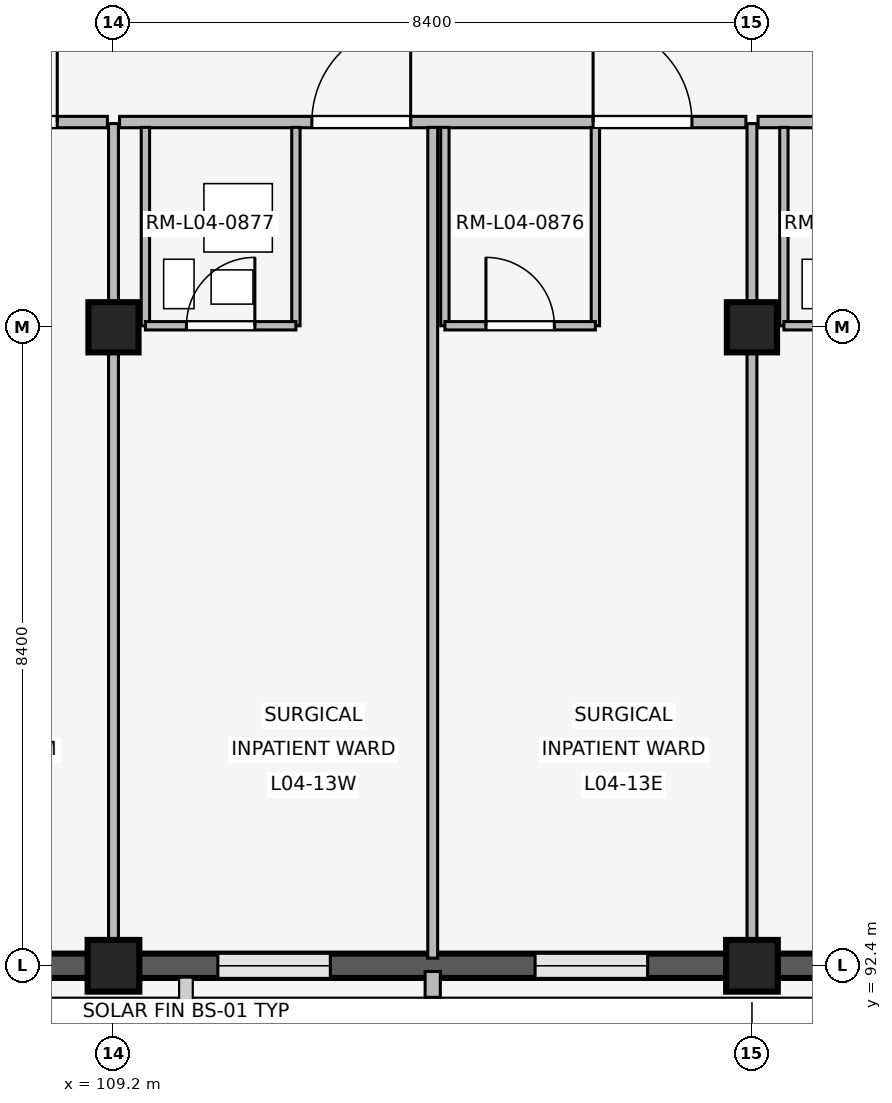
"""IFC4 building model, lengths in metres.
Left out: names, types, materials, properties, quantities, classifications, styles, units other than length and angle.
Written with IfcOpenShell. Run it as: python <this file> out.ifc"""

import sys

from ifc_helpers import new_model, si_unit, direction, frame, frame_2d, origin, origin_2d, place, context, subcontext, project, spatial, rectangle, extrude, element, fill, save


model = new_model("IFC4")
c1 = context("Model", 3, precision=1e-05, world=origin(), true_north=direction((0.0, 1.0)))
c2 = subcontext(c1, "Body", "Model", "MODEL_VIEW")
j1 = project(units=[si_unit("LENGTHUNIT", "METRE"), si_unit("PLANEANGLEUNIT", "RADIAN")], contexts=[c1])
p1 = place(None, origin())
s1 = spatial("IfcSite", under=j1, at=p1, CompositionType="ELEMENT")
p2 = place(p1, origin())
s2 = spatial("IfcBuilding", under=s1, at=p2, CompositionType="ELEMENT")
p3 = place(p2, frame((0.0, 0.0, 16.2)))
s3 = spatial("IfcBuildingStorey", under=s2, at=p3, CompositionType="ELEMENT", Elevation=16.2)
p4 = place(p3, frame((109.2, 92.4, 0.0), z_axis=(0.0, 0.0, 1.0), x_axis=(1.0, 0.0, 0.0)))
e1 = element("IfcColumn", 1, at=p4, inside=s3, PredefinedType="COLUMN", context=c2, shape_type="SweptSolid", body=[
    extrude(rectangle(XDim=0.68, YDim=0.68, at=origin_2d()), origin(), (0.0, 0.0, 1.0), 4.2),
])
p5 = place(p3, frame((109.2, 100.8, 0.0), z_axis=(0.0, 0.0, 1.0), x_axis=(1.0, 0.0, 0.0)))
e2 = element("IfcColumn", 2, at=p5, inside=s3, PredefinedType="COLUMN", context=c2, shape_type="SweptSolid", body=[
    extrude(rectangle(XDim=0.66, YDim=0.66, at=origin_2d()), origin(), (0.0, 0.0, 1.0), 4.2),
])
p6 = place(p3, frame((117.6, 92.4, 0.0), z_axis=(0.0, 0.0, 1.0), x_axis=(1.0, 0.0, 0.0)))
e3 = element("IfcColumn", 3, at=p6, inside=s3, PredefinedType="COLUMN", context=c2, shape_type="SweptSolid", body=[
    extrude(rectangle(XDim=0.68, YDim=0.68, at=origin_2d()), origin(), (0.0, 0.0, 1.0), 4.2),
])
p7 = place(p3, frame((117.6, 100.8, 0.0), z_axis=(0.0, 0.0, 1.0), x_axis=(1.0, 0.0, 0.0)))
e4 = element("IfcColumn", 4, at=p7, inside=s3, PredefinedType="COLUMN", context=c2, shape_type="SweptSolid", body=[
    extrude(rectangle(XDim=0.66, YDim=0.66, at=origin_2d()), origin(), (0.0, 0.0, 1.0), 4.2),
])
p8 = place(p3, frame((108.865, 92.4, 0.0), z_axis=(0.0, 0.0, 1.0), x_axis=(-1.0, 0.0, 0.0)))
e5 = element("IfcWall", 5, at=p8, inside=s3, PredefinedType="SOLIDWALL", context=c2, shape_type="SweptSolid", body=[
    extrude(rectangle(XDim=7.73, YDim=0.32, at=frame_2d((3.865, 0.0))), origin(), (0.0, 0.0, 1.0), 3.32),
])
p9 = place(p8, frame((0.988, 0.0, 0.85)))
e6 = element("IfcOpeningElement", 6, at=p9, cuts=e5, PredefinedType="OPENING", context=c2, shape_type="SweptSolid", body=[
    extrude(rectangle(XDim=1.58, YDim=1.7, at=frame_2d((0.79, 0.85))), frame((0.0, 0.17, 0.0), z_axis=(0.0, -1.0, 0.0), x_axis=(1.0, 0.0, 0.0)), (0.0, 0.0, 1.0), 0.34),
])
p10 = place(p8, frame((5.162, 0.0, 0.85)))
e7 = element("IfcOpeningElement", 7, at=p10, cuts=e5, PredefinedType="OPENING", context=c2, shape_type="SweptSolid", body=[
    extrude(rectangle(XDim=1.58, YDim=1.7, at=frame_2d((0.79, 0.85))), frame((0.0, 0.17, 0.0), z_axis=(0.0, -1.0, 0.0), x_axis=(1.0, 0.0, 0.0)), (0.0, 0.0, 1.0), 0.34),
])
p11 = place(p3, frame((117.265, 92.4, 0.0), z_axis=(0.0, 0.0, 1.0), x_axis=(-1.0, 0.0, 0.0)))
e8 = element("IfcWall", 8, at=p11, inside=s3, PredefinedType="SOLIDWALL", context=c2, shape_type="SweptSolid", body=[
    extrude(rectangle(XDim=7.73, YDim=0.32, at=frame_2d((3.865, 0.0))), origin(), (0.0, 0.0, 1.0), 3.32),
])
p12 = place(p11, frame((1.038, 0.0, 0.85)))
e9 = element("IfcOpeningElement", 9, at=p12, cuts=e8, PredefinedType="OPENING", context=c2, shape_type="SweptSolid", body=[
    extrude(rectangle(XDim=1.48, YDim=1.6, at=frame_2d((0.74, 0.8))), frame((0.0, 0.17, 0.0), z_axis=(0.0, -1.0, 0.0), x_axis=(1.0, 0.0, 0.0)), (0.0, 0.0, 1.0), 0.34),
])
p13 = place(p11, frame((5.212, 0.0, 0.85)))
e10 = element("IfcOpeningElement", 10, at=p13, cuts=e8, PredefinedType="OPENING", context=c2, shape_type="SweptSolid", body=[
    extrude(rectangle(XDim=1.48, YDim=1.6, at=frame_2d((0.74, 0.8))), frame((0.0, 0.17, 0.0), z_axis=(0.0, -1.0, 0.0), x_axis=(1.0, 0.0, 0.0)), (0.0, 0.0, 1.0), 0.34),
])
p14 = place(p3, frame((113.4, 92.325, 0.0), z_axis=(0.0, 0.0, 1.0), x_axis=(0.0, -1.0, 0.0)))
e11 = element("IfcWall", 11, at=p14, inside=s3, PredefinedType="ELEMENTEDWALL", context=c2, shape_type="SweptSolid", body=[
    extrude(rectangle(XDim=0.34, YDim=0.2, at=frame_2d((0.17, 0.0))), origin(), (0.0, 0.0, 1.0), 3.3),
])
p15 = place(p3, frame((125.665, 92.4, 0.0), z_axis=(0.0, 0.0, 1.0), x_axis=(-1.0, 0.0, 0.0)))
e12 = element("IfcWall", 12, at=p15, inside=s3, PredefinedType="SOLIDWALL", context=c2, shape_type="SweptSolid", body=[
    extrude(rectangle(XDim=7.73, YDim=0.32, at=frame_2d((3.865, 0.0))), origin(), (0.0, 0.0, 1.0), 3.32),
])
p16 = place(p15, frame((1.068, 0.0, 0.85)))
e13 = element("IfcOpeningElement", 13, at=p16, cuts=e12, PredefinedType="OPENING", context=c2, shape_type="SweptSolid", body=[
    extrude(rectangle(XDim=1.42, YDim=1.45, at=frame_2d((0.71, 0.725))), frame((0.0, 0.17, 0.0), z_axis=(0.0, -1.0, 0.0), x_axis=(1.0, 0.0, 0.0)), (0.0, 0.0, 1.0), 0.34),
])
p17 = place(p15, frame((5.242, 0.0, 0.85)))
e14 = element("IfcOpeningElement", 14, at=p17, cuts=e12, PredefinedType="OPENING", context=c2, shape_type="SweptSolid", body=[
    extrude(rectangle(XDim=1.42, YDim=1.45, at=frame_2d((0.71, 0.725))), frame((0.0, 0.17, 0.0), z_axis=(0.0, -1.0, 0.0), x_axis=(1.0, 0.0, 0.0)), (0.0, 0.0, 1.0), 0.34),
])
p18 = place(p3, frame((100.88, 103.5, 0.0), z_axis=(0.0, 0.0, 1.0), x_axis=(1.0, 0.0, 0.0)))
e15 = element("IfcWall", 15, at=p18, inside=s3, PredefinedType="PARTITIONING", context=c2, shape_type="SweptSolid", body=[
    extrude(rectangle(XDim=8.24, YDim=0.15, at=frame_2d((4.12, 0.0))), origin(), (0.0, 0.0, 1.0), 3.3),
])
p19 = place(p18, frame((2.53, 0.0, 0.0)))
e16 = element("IfcOpeningElement", 16, at=p19, cuts=e15, PredefinedType="OPENING", context=c2, shape_type="SweptSolid", body=[
    extrude(rectangle(XDim=1.35, YDim=2.25, at=frame_2d((0.675, 1.125))), frame((0.0, 0.085, 0.0), z_axis=(0.0, -1.0, 0.0), x_axis=(1.0, 0.0, 0.0)), (0.0, 0.0, 1.0), 0.17),
])
p20 = place(p18, frame((6.23, 0.0, 0.0)))
e17 = element("IfcOpeningElement", 17, at=p20, cuts=e15, PredefinedType="OPENING", context=c2, shape_type="SweptSolid", body=[
    extrude(rectangle(XDim=1.35, YDim=2.25, at=frame_2d((0.675, 1.125))), frame((0.0, 0.085, 0.0), z_axis=(0.0, -1.0, 0.0), x_axis=(1.0, 0.0, 0.0)), (0.0, 0.0, 1.0), 0.17),
])
p21 = place(p3, frame((109.2, 92.54, 0.0), z_axis=(0.0, 0.0, 1.0), x_axis=(0.0, 1.0, 0.0)))
e18 = element("IfcWall", 18, at=p21, inside=s3, PredefinedType="PARTITIONING", context=c2, shape_type="SweptSolid", body=[
    extrude(rectangle(XDim=10.94, YDim=0.13, at=frame_2d((5.47, 0.0))), origin(), (0.0, 0.0, 1.0), 3.3),
])
p22 = place(p3, frame((109.28, 103.5, 0.0), z_axis=(0.0, 0.0, 1.0), x_axis=(1.0, 0.0, 0.0)))
e19 = element("IfcWall", 19, at=p22, inside=s3, PredefinedType="PARTITIONING", context=c2, shape_type="SweptSolid", body=[
    extrude(rectangle(XDim=8.24, YDim=0.15, at=frame_2d((4.12, 0.0))), origin(), (0.0, 0.0, 1.0), 3.3),
])
p23 = place(p22, frame((2.53, 0.0, 0.0)))
e20 = element("IfcOpeningElement", 20, at=p23, cuts=e19, PredefinedType="OPENING", context=c2, shape_type="SweptSolid", body=[
    extrude(rectangle(XDim=1.3, YDim=2.25, at=frame_2d((0.65, 1.125))), frame((0.0, 0.085, 0.0), z_axis=(0.0, -1.0, 0.0), x_axis=(1.0, 0.0, 0.0)), (0.0, 0.0, 1.0), 0.17),
])
p24 = place(p22, frame((6.23, 0.0, 0.0)))
e21 = element("IfcOpeningElement", 21, at=p24, cuts=e19, PredefinedType="OPENING", context=c2, shape_type="SweptSolid", body=[
    extrude(rectangle(XDim=1.3, YDim=2.25, at=frame_2d((0.65, 1.125))), frame((0.0, 0.085, 0.0), z_axis=(0.0, -1.0, 0.0), x_axis=(1.0, 0.0, 0.0)), (0.0, 0.0, 1.0), 0.17),
])
p25 = place(p3, frame((113.4, 92.5, 0.0), z_axis=(0.0, 0.0, 1.0), x_axis=(0.0, 1.0, 0.0)))
e22 = element("IfcWall", 22, at=p25, inside=s3, PredefinedType="PARTITIONING", context=c2, shape_type="SweptSolid", body=[
    extrude(rectangle(XDim=10.93, YDim=0.13, at=frame_2d((5.465, 0.0))), origin(), (0.0, 0.0, 1.0), 3.3),
])
for number, where, z_axis, x_axis in (
    (23, (109.62, 100.82, 0.0), (0.0, 0.0, 1.0), (0.0, 1.0, 0.0)),
    (24, (111.6, 100.82, 0.0), (0.0, 0.0, 1.0), (0.0, 1.0, 0.0)),
):
    element("IfcWall", number, at=place(p3, frame(where, z_axis=z_axis, x_axis=x_axis)), inside=s3, PredefinedType="PARTITIONING", context=c2, shape_type="SweptSolid", body=[
        extrude(rectangle(XDim=2.61, YDim=0.11, at=frame_2d((1.305, 0.0))), origin(), (0.0, 0.0, 1.0), 3.3),
    ])
p26 = place(p3, frame((109.62, 100.82, 0.0), z_axis=(0.0, 0.0, 1.0), x_axis=(1.0, 0.0, 0.0)))
e25 = element("IfcWall", 25, at=p26, inside=s3, PredefinedType="PARTITIONING", context=c2, shape_type="SweptSolid", body=[
    extrude(rectangle(XDim=1.98, YDim=0.11, at=frame_2d((0.99, 0.0))), origin(), (0.0, 0.0, 1.0), 3.3),
])
p27 = place(p26, frame((0.54, 0.0, 0.0)))
e26 = element("IfcOpeningElement", 26, at=p27, cuts=e25, PredefinedType="OPENING", context=c2, shape_type="SweptSolid", body=[
    extrude(rectangle(XDim=0.9, YDim=2.1, at=frame_2d((0.45, 1.05))), frame((0.0, 0.065, 0.0), z_axis=(0.0, -1.0, 0.0), x_axis=(1.0, 0.0, 0.0)), (0.0, 0.0, 1.0), 0.13),
])
for number, where, z_axis, x_axis in (
    (27, (113.56, 100.82, 0.0), (0.0, 0.0, 1.0), (0.0, 1.0, 0.0)),
    (28, (115.54, 100.82, 0.0), (0.0, 0.0, 1.0), (0.0, 1.0, 0.0)),
):
    element("IfcWall", number, at=place(p3, frame(where, z_axis=z_axis, x_axis=x_axis)), inside=s3, PredefinedType="PARTITIONING", context=c2, shape_type="SweptSolid", body=[
        extrude(rectangle(XDim=2.61, YDim=0.11, at=frame_2d((1.305, 0.0))), origin(), (0.0, 0.0, 1.0), 3.3),
    ])
p28 = place(p3, frame((113.56, 100.82, 0.0), z_axis=(0.0, 0.0, 1.0), x_axis=(1.0, 0.0, 0.0)))
e29 = element("IfcWall", 29, at=p28, inside=s3, PredefinedType="PARTITIONING", context=c2, shape_type="SweptSolid", body=[
    extrude(rectangle(XDim=1.98, YDim=0.11, at=frame_2d((0.99, 0.0))), origin(), (0.0, 0.0, 1.0), 3.3),
])
p29 = place(p28, frame((0.54, 0.0, 0.0)))
e30 = element("IfcOpeningElement", 30, at=p29, cuts=e29, PredefinedType="OPENING", context=c2, shape_type="SweptSolid", body=[
    extrude(rectangle(XDim=0.9, YDim=2.1, at=frame_2d((0.45, 1.05))), frame((0.0, 0.065, 0.0), z_axis=(0.0, -1.0, 0.0), x_axis=(1.0, 0.0, 0.0)), (0.0, 0.0, 1.0), 0.13),
])
p30 = place(p3, frame((117.6, 92.54, 0.0), z_axis=(0.0, 0.0, 1.0), x_axis=(0.0, 1.0, 0.0)))
e31 = element("IfcWall", 31, at=p30, inside=s3, PredefinedType="PARTITIONING", context=c2, shape_type="SweptSolid", body=[
    extrude(rectangle(XDim=10.94, YDim=0.13, at=frame_2d((5.47, 0.0))), origin(), (0.0, 0.0, 1.0), 3.3),
])
p31 = place(p3, frame((117.68, 103.5, 0.0), z_axis=(0.0, 0.0, 1.0), x_axis=(1.0, 0.0, 0.0)))
e32 = element("IfcWall", 32, at=p31, inside=s3, PredefinedType="PARTITIONING", context=c2, shape_type="SweptSolid", body=[
    extrude(rectangle(XDim=8.24, YDim=0.15, at=frame_2d((4.12, 0.0))), origin(), (0.0, 0.0, 1.0), 3.3),
])
p32 = place(p31, frame((2.53, 0.0, 0.0)))
e33 = element("IfcOpeningElement", 33, at=p32, cuts=e32, PredefinedType="OPENING", context=c2, shape_type="SweptSolid", body=[
    extrude(rectangle(XDim=1.3, YDim=2.25, at=frame_2d((0.65, 1.125))), frame((0.0, 0.085, 0.0), z_axis=(0.0, -1.0, 0.0), x_axis=(1.0, 0.0, 0.0)), (0.0, 0.0, 1.0), 0.17),
])
p33 = place(p31, frame((6.23, 0.0, 0.0)))
e34 = element("IfcOpeningElement", 34, at=p33, cuts=e32, PredefinedType="OPENING", context=c2, shape_type="SweptSolid", body=[
    extrude(rectangle(XDim=1.3, YDim=2.25, at=frame_2d((0.65, 1.125))), frame((0.0, 0.085, 0.0), z_axis=(0.0, -1.0, 0.0), x_axis=(1.0, 0.0, 0.0)), (0.0, 0.0, 1.0), 0.17),
])
p34 = place(p3, frame((118.02, 100.82, 0.0), z_axis=(0.0, 0.0, 1.0), x_axis=(0.0, 1.0, 0.0)))
e35 = element("IfcWall", 35, at=p34, inside=s3, PredefinedType="PARTITIONING", context=c2, shape_type="SweptSolid", body=[
    extrude(rectangle(XDim=2.61, YDim=0.11, at=frame_2d((1.305, 0.0))), origin(), (0.0, 0.0, 1.0), 3.3),
])
p35 = place(p3, frame((118.02, 100.82, 0.0), z_axis=(0.0, 0.0, 1.0), x_axis=(1.0, 0.0, 0.0)))
e36 = element("IfcWall", 36, at=p35, inside=s3, PredefinedType="PARTITIONING", context=c2, shape_type="SweptSolid", body=[
    extrude(rectangle(XDim=1.98, YDim=0.11, at=frame_2d((0.99, 0.0))), origin(), (0.0, 0.0, 1.0), 3.3),
])
p36 = place(p35, frame((0.54, 0.0, 0.0)))
e37 = element("IfcOpeningElement", 37, at=p36, cuts=e36, PredefinedType="OPENING", context=c2, shape_type="SweptSolid", body=[
    extrude(rectangle(XDim=0.9, YDim=2.1, at=frame_2d((0.45, 1.05))), frame((0.0, 0.065, 0.0), z_axis=(0.0, -1.0, 0.0), x_axis=(1.0, 0.0, 0.0)), (0.0, 0.0, 1.0), 0.13),
])
p37 = place(p12, origin())
e38 = element("IfcWindow", 38, at=p37, inside=s3, PartitioningType="SINGLE_PANEL", PredefinedType="WINDOW", context=c2, shape_type="SweptSolid", body=[
    extrude(rectangle(XDim=1.48, YDim=1.6, at=frame_2d((0.74, 0.8))), frame((0.0, 0.03, 0.0), z_axis=(0.0, -1.0, 0.0), x_axis=(1.0, 0.0, 0.0)), (0.0, 0.0, 1.0), 0.06),
])
fill(e9, e38)
p38 = place(p13, origin())
e39 = element("IfcWindow", 39, at=p38, inside=s3, PartitioningType="SINGLE_PANEL", PredefinedType="WINDOW", context=c2, shape_type="SweptSolid", body=[
    extrude(rectangle(XDim=1.48, YDim=1.6, at=frame_2d((0.74, 0.8))), frame((0.0, 0.03, 0.0), z_axis=(0.0, -1.0, 0.0), x_axis=(1.0, 0.0, 0.0)), (0.0, 0.0, 1.0), 0.06),
])
fill(e10, e39)
p39 = place(p20, origin())
e40 = element("IfcDoor", 40, at=p39, inside=s3, OperationType="SINGLE_SWING_RIGHT", PredefinedType="DOOR", context=c2, shape_type="SweptSolid", body=[
    extrude(rectangle(XDim=1.35, YDim=2.25, at=frame_2d((0.675, 1.125))), frame((0.0, 0.025, 0.0), z_axis=(0.0, -1.0, 0.0), x_axis=(1.0, 0.0, 0.0)), (0.0, 0.0, 1.0), 0.05),
])
fill(e17, e40)
p40 = place(p23, origin())
e41 = element("IfcDoor", 41, at=p40, inside=s3, OperationType="SINGLE_SWING_RIGHT", PredefinedType="DOOR", context=c2, shape_type="SweptSolid", body=[
    extrude(rectangle(XDim=1.3, YDim=2.25, at=frame_2d((0.65, 1.125))), frame((0.0, 0.025, 0.0), z_axis=(0.0, -1.0, 0.0), x_axis=(1.0, 0.0, 0.0)), (0.0, 0.0, 1.0), 0.05),
])
fill(e20, e41)
p41 = place(p24, origin())
e42 = element("IfcDoor", 42, at=p41, inside=s3, OperationType="SINGLE_SWING_LEFT", PredefinedType="DOOR", context=c2, shape_type="SweptSolid", body=[
    extrude(rectangle(XDim=1.3, YDim=2.25, at=frame_2d((0.65, 1.125))), frame((0.0, 0.025, 0.0), z_axis=(0.0, -1.0, 0.0), x_axis=(1.0, 0.0, 0.0)), (0.0, 0.0, 1.0), 0.05),
])
fill(e21, e42)
p42 = place(p27, origin())
e43 = element("IfcDoor", 43, at=p42, inside=s3, OperationType="SINGLE_SWING_RIGHT", PredefinedType="DOOR", context=c2, shape_type="SweptSolid", body=[
    extrude(rectangle(XDim=0.9, YDim=2.1, at=frame_2d((0.45, 1.05))), frame((0.0, 0.025, 0.0), z_axis=(0.0, -1.0, 0.0), x_axis=(1.0, 0.0, 0.0)), (0.0, 0.0, 1.0), 0.05),
])
fill(e26, e43)
p43 = place(p29, origin())
e44 = element("IfcDoor", 44, at=p43, inside=s3, OperationType="SINGLE_SWING_LEFT", PredefinedType="DOOR", context=c2, shape_type="SweptSolid", body=[
    extrude(rectangle(XDim=0.9, YDim=2.1, at=frame_2d((0.45, 1.05))), frame((0.0, 0.025, 0.0), z_axis=(0.0, -1.0, 0.0), x_axis=(1.0, 0.0, 0.0)), (0.0, 0.0, 1.0), 0.05),
])
fill(e30, e44)
save(model, sys.argv[1])
